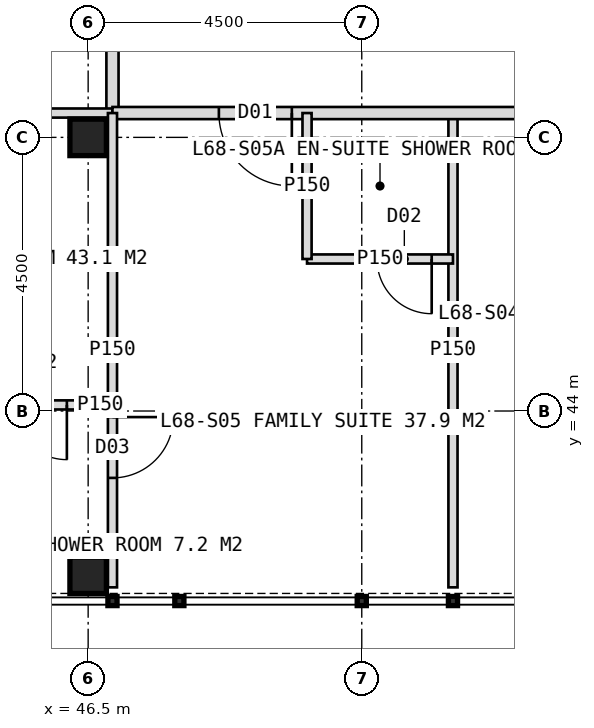
"""IFC4 building model, lengths in metres.
Left out: names, types, materials, properties, quantities, classifications, styles, units other than length and angle.
Written with IfcOpenShell. Run it as: python <this file> out.ifc"""

import sys

from ifc_helpers import new_model, si_unit, direction, frame, frame_2d, origin, origin_2d, place, context, subcontext, project, spatial, rectangle, hollow_rectangle, extrude, element, fill, save


model = new_model("IFC4")
c1 = context("Model", 3, precision=1e-05, world=origin(), true_north=direction((0.0, 1.0)))
c2 = subcontext(c1, "Body", "Model", "MODEL_VIEW")
j1 = project(units=[si_unit("LENGTHUNIT", "METRE"), si_unit("PLANEANGLEUNIT", "RADIAN")], contexts=[c1])
p1 = place(None, origin())
s1 = spatial("IfcSite", under=j1, at=p1, CompositionType="ELEMENT")
p2 = place(p1, origin())
s2 = spatial("IfcBuilding", under=s1, at=p2, CompositionType="ELEMENT")
p3 = place(p2, frame((0.0, 0.0, 282.0)))
s3 = spatial("IfcBuildingStorey", under=s2, at=p3, CompositionType="ELEMENT", Elevation=282.0)
for number, where, z_axis, x_axis in (
    (1, (46.5, 48.5, 0.0), (0.0, 0.0, 1.0), (1.0, 0.0, 0.0)),
    (2, (46.5, 41.3, 0.0), (0.0, 0.0, 1.0), (1.0, 0.0, 0.0)),
):
    element("IfcColumn", number, at=place(p3, frame(where, z_axis=z_axis, x_axis=x_axis)), inside=s3, PredefinedType="COLUMN", context=c2, shape_type="SweptSolid", body=[
        extrude(hollow_rectangle(XDim=0.6, YDim=0.6, WallThickness=0.04, at=origin_2d()), origin(), (0.0, 0.0, 1.0), 4.0),
    ])
p4 = place(p3, frame((46.9, 48.9, 0.0), z_axis=(0.0, 0.0, 1.0), x_axis=(0.0, 1.0, 0.0)))
e3 = element("IfcWall", 3, at=p4, inside=s3, PredefinedType="PARTITIONING", context=c2, shape_type="SweptSolid", body=[
    extrude(rectangle(XDim=26.2, YDim=0.2, at=frame_2d((13.1, 0.0))), origin(), (0.0, 0.0, 1.0), 3.75),
])
p5 = place(p4, frame((1.55, 0.0, 0.0)))
e4 = element("IfcOpeningElement", 4, at=p5, cuts=e3, PredefinedType="OPENING", context=c2, shape_type="SweptSolid", body=[
    extrude(rectangle(XDim=1.0, YDim=2.1, at=frame_2d((0.5, 1.05))), frame((0.0, 0.11, 0.0), z_axis=(0.0, -1.0, 0.0), x_axis=(1.0, 0.0, 0.0)), (0.0, 0.0, 1.0), 0.22),
])
p6 = place(p4, frame((6.6, 0.0, 0.0)))
e5 = element("IfcOpeningElement", 5, at=p6, cuts=e3, PredefinedType="OPENING", context=c2, shape_type="SweptSolid", body=[
    extrude(rectangle(XDim=1.0, YDim=2.1, at=frame_2d((0.5, 1.05))), frame((0.0, 0.11, 0.0), z_axis=(0.0, -1.0, 0.0), x_axis=(1.0, 0.0, 0.0)), (0.0, 0.0, 1.0), 0.22),
])
p7 = place(p4, frame((11.1, 0.0, 0.0)))
e6 = element("IfcOpeningElement", 6, at=p7, cuts=e3, PredefinedType="OPENING", context=c2, shape_type="SweptSolid", body=[
    extrude(rectangle(XDim=1.0, YDim=2.1, at=frame_2d((0.5, 1.05))), frame((0.0, 0.11, 0.0), z_axis=(0.0, -1.0, 0.0), x_axis=(1.0, 0.0, 0.0)), (0.0, 0.0, 1.0), 0.22),
])
p8 = place(p4, frame((18.45, 0.0, 0.0)))
e7 = element("IfcOpeningElement", 7, at=p8, cuts=e3, PredefinedType="OPENING", context=c2, shape_type="SweptSolid", body=[
    extrude(rectangle(XDim=1.2, YDim=2.2, at=frame_2d((0.6, 1.1))), frame((0.0, 0.11, 0.0), z_axis=(0.0, -1.0, 0.0), x_axis=(1.0, 0.0, 0.0)), (0.0, 0.0, 1.0), 0.22),
])
p9 = place(p4, frame((22.9, 0.0, 0.0)))
e8 = element("IfcOpeningElement", 8, at=p9, cuts=e3, PredefinedType="OPENING", context=c2, shape_type="SweptSolid", body=[
    extrude(rectangle(XDim=1.0, YDim=2.1, at=frame_2d((0.5, 1.05))), frame((0.0, 0.11, 0.0), z_axis=(0.0, -1.0, 0.0), x_axis=(1.0, 0.0, 0.0)), (0.0, 0.0, 1.0), 0.22),
])
for number, where, z_axis, x_axis in (
    (9, (46.9, 48.9, 0.0), (0.0, 0.0, 1.0), (-1.0, 0.0, 0.0)),
    (10, (52.5, 48.9, 0.0), (0.0, 0.0, 1.0), (0.0, -1.0, 0.0)),
):
    element("IfcWall", number, at=place(p3, frame(where, z_axis=z_axis, x_axis=x_axis)), inside=s3, PredefinedType="PARTITIONING", context=c2, shape_type="SweptSolid", body=[
        extrude(rectangle(XDim=7.8, YDim=0.15, at=frame_2d((3.9, 0.0))), origin(), (0.0, 0.0, 1.0), 3.75),
    ])
p10 = place(p3, frame((73.1, 48.9, 0.0), z_axis=(0.0, 0.0, 1.0), x_axis=(-1.0, 0.0, 0.0)))
e11 = element("IfcWall", 11, at=p10, inside=s3, PredefinedType="PARTITIONING", context=c2, shape_type="SweptSolid", body=[
    extrude(rectangle(XDim=26.2, YDim=0.2, at=frame_2d((13.1, 0.0))), origin(), (0.0, 0.0, 1.0), 3.75),
])
p11 = place(p10, frame((1.75, 0.0, 0.0)))
e12 = element("IfcOpeningElement", 12, at=p11, cuts=e11, PredefinedType="OPENING", context=c2, shape_type="SweptSolid", body=[
    extrude(rectangle(XDim=1.2, YDim=2.2, at=frame_2d((0.6, 1.1))), frame((0.0, 0.11, 0.0), z_axis=(0.0, -1.0, 0.0), x_axis=(1.0, 0.0, 0.0)), (0.0, 0.0, 1.0), 0.22),
])
p12 = place(p10, frame((6.75, 0.0, 0.0)))
e13 = element("IfcOpeningElement", 13, at=p12, cuts=e11, PredefinedType="OPENING", context=c2, shape_type="SweptSolid", body=[
    extrude(rectangle(XDim=1.0, YDim=2.1, at=frame_2d((0.5, 1.05))), frame((0.0, 0.11, 0.0), z_axis=(0.0, -1.0, 0.0), x_axis=(1.0, 0.0, 0.0)), (0.0, 0.0, 1.0), 0.22),
])
p13 = place(p10, frame((11.85, 0.0, 0.0)))
e14 = element("IfcOpeningElement", 14, at=p13, cuts=e11, PredefinedType="OPENING", context=c2, shape_type="SweptSolid", body=[
    extrude(rectangle(XDim=1.0, YDim=2.1, at=frame_2d((0.5, 1.05))), frame((0.0, 0.11, 0.0), z_axis=(0.0, -1.0, 0.0), x_axis=(1.0, 0.0, 0.0)), (0.0, 0.0, 1.0), 0.22),
])
p14 = place(p10, frame((15.75, 0.0, 0.0)))
e15 = element("IfcOpeningElement", 15, at=p14, cuts=e11, PredefinedType="OPENING", context=c2, shape_type="SweptSolid", body=[
    extrude(rectangle(XDim=1.0, YDim=2.1, at=frame_2d((0.5, 1.05))), frame((0.0, 0.11, 0.0), z_axis=(0.0, -1.0, 0.0), x_axis=(1.0, 0.0, 0.0)), (0.0, 0.0, 1.0), 0.22),
])
p15 = place(p10, frame((23.25, 0.0, 0.0)))
e16 = element("IfcOpeningElement", 16, at=p15, cuts=e11, PredefinedType="OPENING", context=c2, shape_type="SweptSolid", body=[
    extrude(rectangle(XDim=1.2, YDim=2.2, at=frame_2d((0.6, 1.1))), frame((0.0, 0.11, 0.0), z_axis=(0.0, -1.0, 0.0), x_axis=(1.0, 0.0, 0.0)), (0.0, 0.0, 1.0), 0.22),
])
p16 = place(p3, frame((46.9, 48.9, 0.0), z_axis=(0.0, 0.0, 1.0), x_axis=(0.0, -1.0, 0.0)))
e17 = element("IfcWall", 17, at=p16, inside=s3, PredefinedType="PARTITIONING", context=c2, shape_type="SweptSolid", body=[
    extrude(rectangle(XDim=7.8, YDim=0.15, at=frame_2d((3.9, 0.0))), origin(), (0.0, 0.0, 1.0), 3.75),
])
p17 = place(p16, frame((5.0, 0.0, 0.0)))
e18 = element("IfcOpeningElement", 18, at=p17, cuts=e17, PredefinedType="OPENING", context=c2, shape_type="SweptSolid", body=[
    extrude(rectangle(XDim=1.0, YDim=2.1, at=frame_2d((0.5, 1.05))), frame((0.0, 0.085, 0.0), z_axis=(0.0, -1.0, 0.0), x_axis=(1.0, 0.0, 0.0)), (0.0, 0.0, 1.0), 0.17),
])
p18 = place(p3, frame((46.9, 44.1, 0.0), z_axis=(0.0, 0.0, 1.0), x_axis=(-1.0, 0.0, 0.0)))
e19 = element("IfcWall", 19, at=p18, inside=s3, PredefinedType="PARTITIONING", context=c2, shape_type="SweptSolid", body=[
    extrude(rectangle(XDim=0.4, YDim=0.15, at=frame_2d((0.2, 0.0))), origin(), (0.0, 0.0, 1.0), 3.75),
])
p19 = place(p3, frame((46.5, 44.1, 0.0), z_axis=(0.0, 0.0, 1.0), x_axis=(-1.0, 0.0, 0.0)))
e20 = element("IfcWall", 20, at=p19, inside=s3, PredefinedType="PARTITIONING", context=c2, shape_type="SweptSolid", body=[
    extrude(rectangle(XDim=2.0, YDim=0.15, at=frame_2d((1.0, 0.0))), origin(), (0.0, 0.0, 1.0), 2.95),
])
p20 = place(p19, frame((0.35, 0.0, 0.0)))
e21 = element("IfcOpeningElement", 21, at=p20, cuts=e20, PredefinedType="OPENING", context=c2, shape_type="SweptSolid", body=[
    extrude(rectangle(XDim=0.9, YDim=2.1, at=frame_2d((0.45, 1.05))), frame((0.0, 0.085, 0.0), z_axis=(0.0, -1.0, 0.0), x_axis=(1.0, 0.0, 0.0)), (0.0, 0.0, 1.0), 0.17),
])
p21 = place(p3, frame((52.5, 46.5, 0.0), z_axis=(0.0, 0.0, 1.0), x_axis=(-1.0, 0.0, 0.0)))
e22 = element("IfcWall", 22, at=p21, inside=s3, PredefinedType="PARTITIONING", context=c2, shape_type="SweptSolid", body=[
    extrude(rectangle(XDim=2.4, YDim=0.15, at=frame_2d((1.2, 0.0))), origin(), (0.0, 0.0, 1.0), 3.75),
])
p22 = place(p21, frame((0.35, 0.0, 0.0)))
e23 = element("IfcOpeningElement", 23, at=p22, cuts=e22, PredefinedType="OPENING", context=c2, shape_type="SweptSolid", body=[
    extrude(rectangle(XDim=0.9, YDim=2.1, at=frame_2d((0.45, 1.05))), frame((0.0, 0.085, 0.0), z_axis=(0.0, -1.0, 0.0), x_axis=(1.0, 0.0, 0.0)), (0.0, 0.0, 1.0), 0.17),
])
p23 = place(p3, frame((50.1, 48.9, 0.0), z_axis=(0.0, 0.0, 1.0), x_axis=(0.0, -1.0, 0.0)))
e24 = element("IfcWall", 24, at=p23, inside=s3, PredefinedType="PARTITIONING", context=c2, shape_type="SweptSolid", body=[
    extrude(rectangle(XDim=2.4, YDim=0.15, at=frame_2d((1.2, 0.0))), origin(), (0.0, 0.0, 1.0), 3.75),
])
p24 = place(p20, origin())
e25 = element("IfcDoor", 25, at=p24, inside=s3, OperationType="SINGLE_SWING_LEFT", PredefinedType="DOOR", context=c2, shape_type="SweptSolid", body=[
    extrude(rectangle(XDim=0.9, YDim=2.1, at=frame_2d((0.45, 1.05))), frame((0.0, 0.025, 0.0), z_axis=(0.0, -1.0, 0.0), x_axis=(1.0, 0.0, 0.0)), (0.0, 0.0, 1.0), 0.05),
])
fill(e21, e25)
p25 = place(p17, origin())
e26 = element("IfcDoor", 26, at=p25, inside=s3, OperationType="SINGLE_SWING_LEFT", PredefinedType="DOOR", context=c2, shape_type="SweptSolid", body=[
    extrude(rectangle(XDim=1.0, YDim=2.1, at=frame_2d((0.5, 1.05))), frame((0.0, 0.025, 0.0), z_axis=(0.0, -1.0, 0.0), x_axis=(1.0, 0.0, 0.0)), (0.0, 0.0, 1.0), 0.05),
])
fill(e18, e26)
p26 = place(p15, origin())
e27 = element("IfcDoor", 27, at=p26, inside=s3, OperationType="SINGLE_SWING_LEFT", PredefinedType="DOOR", context=c2, shape_type="SweptSolid", body=[
    extrude(rectangle(XDim=1.2, YDim=2.2, at=frame_2d((0.6, 1.1))), frame((0.0, 0.025, 0.0), z_axis=(0.0, -1.0, 0.0), x_axis=(1.0, 0.0, 0.0)), (0.0, 0.0, 1.0), 0.05),
])
fill(e16, e27)
p27 = place(p22, origin())
e28 = element("IfcDoor", 28, at=p27, inside=s3, OperationType="SINGLE_SWING_LEFT", PredefinedType="DOOR", context=c2, shape_type="SweptSolid", body=[
    extrude(rectangle(XDim=0.9, YDim=2.1, at=frame_2d((0.45, 1.05))), frame((0.0, 0.025, 0.0), z_axis=(0.0, -1.0, 0.0), x_axis=(1.0, 0.0, 0.0)), (0.0, 0.0, 1.0), 0.05),
])
fill(e23, e28)
save(model, sys.argv[1])
